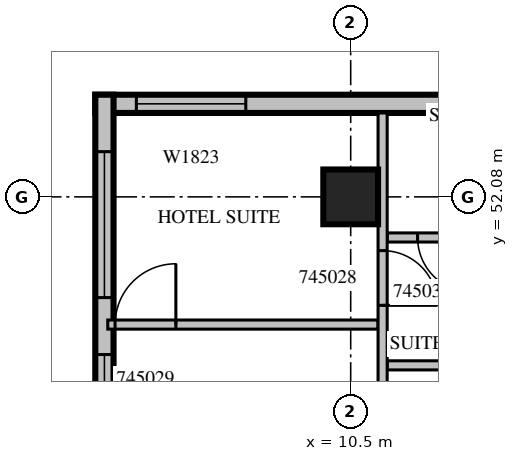
"""IFC4 building model, lengths in metres.
Left out: names, types, materials, properties, quantities, classifications, styles, units other than length and angle.
Written with IfcOpenShell. Run it as: python <this file> out.ifc"""

import sys

from ifc_helpers import new_model, si_unit, direction, frame, frame_2d, origin, origin_2d, place, context, subcontext, project, spatial, rectangle, extrude, source, transform, mapped, element, fill, save


model = new_model("IFC4")
c1 = context("Model", 3, precision=1e-05, world=origin(), true_north=direction((0.0, 1.0)))
c2 = subcontext(c1, "Body", "Model", "MODEL_VIEW")
j1 = project(units=[si_unit("LENGTHUNIT", "METRE"), si_unit("PLANEANGLEUNIT", "RADIAN")], contexts=[c1])
p1 = place(None, origin())
s1 = spatial("IfcSite", under=j1, at=p1, CompositionType="ELEMENT")
p2 = place(p1, origin())
s2 = spatial("IfcBuilding", under=s1, at=p2, CompositionType="ELEMENT")
p3 = place(p2, frame((0.0, 0.0, 204.4)))
s3 = spatial("IfcBuildingStorey", under=s2, at=p3, CompositionType="ELEMENT", Elevation=204.4)
m1 = source(origin(), c2, "Body", "SweptSolid", [
    extrude(rectangle(XDim=0.9, YDim=0.9, at=origin_2d()), origin(), (0.0, 0.0, 1.0), 3.8),
])
p4 = place(p3, frame((10.5, 52.08, 0.0), z_axis=(0.0, 0.0, 1.0), x_axis=(1.0, 0.0, 0.0)))
e1 = element("IfcColumn", 1, at=p4, inside=s3, PredefinedType="COLUMN", context=c2, shape_type="MappedRepresentation", body=[
    mapped(m1, transform((0.0, 0.0, 0.0), scale=1.0)),
])
m2 = source(origin(), c2, "Body", "SweptSolid", [
    extrude(rectangle(XDim=10.5, YDim=0.3, at=frame_2d((5.25, 0.0))), origin(), (0.0, 0.0, 1.0), 3.4),
])
p5 = place(p3, frame((16.8, 53.61, 0.0), z_axis=(0.0, 0.0, 1.0), x_axis=(-1.0, 0.0, 0.0)))
e2 = element("IfcWall", 2, at=p5, inside=s3, PredefinedType="STANDARD", context=c2, shape_type="MappedRepresentation", body=[
    mapped(m2, transform((0.0, 0.0, 0.0), scale=1.0)),
])
m3 = source(origin(), c2, "Body", "SweptSolid", [
    extrude(rectangle(XDim=1.2, YDim=2.3, at=frame_2d((0.6, 1.15))), frame((0.0, 0.16, 0.0), z_axis=(0.0, -1.0, 0.0), x_axis=(1.0, 0.0, 0.0)), (0.0, 0.0, 1.0), 0.32),
])
p6 = place(p5, frame((2.15, 0.0, 0.6)))
e3 = element("IfcOpeningElement", 3, at=p6, cuts=e2, PredefinedType="OPENING", context=c2, shape_type="MappedRepresentation", body=[
    mapped(m3, transform((0.0, 0.0, 0.0), scale=1.0)),
])
m4 = source(origin(), c2, "Body", "SweptSolid", [
    extrude(rectangle(XDim=1.8, YDim=2.3, at=frame_2d((0.9, 1.15))), frame((0.0, 0.16, 0.0), z_axis=(0.0, -1.0, 0.0), x_axis=(1.0, 0.0, 0.0)), (0.0, 0.0, 1.0), 0.32),
])
p7 = place(p5, frame((8.025, 0.0, 0.6)))
e4 = element("IfcOpeningElement", 4, at=p7, cuts=e2, PredefinedType="OPENING", context=c2, shape_type="MappedRepresentation", body=[
    mapped(m4, transform((0.0, 0.0, 0.0), scale=1.0)),
])
m5 = source(origin(), c2, "Body", "SweptSolid", [
    extrude(rectangle(XDim=9.91, YDim=0.3, at=frame_2d((4.955, 0.0))), origin(), (0.0, 0.0, 1.0), 3.4),
])
p8 = place(p3, frame((6.45, 53.76, 0.0), z_axis=(0.0, 0.0, 1.0), x_axis=(0.0, -1.0, 0.0)))
e5 = element("IfcWall", 5, at=p8, inside=s3, PredefinedType="STANDARD", context=c2, shape_type="MappedRepresentation", body=[
    mapped(m5, transform((0.0, 0.0, 0.0), scale=1.0)),
])
m6 = source(origin(), c2, "Body", "SweptSolid", [
    extrude(rectangle(XDim=2.4, YDim=2.3, at=frame_2d((1.2, 1.15))), frame((0.0, 0.16, 0.0), z_axis=(0.0, -1.0, 0.0), x_axis=(1.0, 0.0, 0.0)), (0.0, 0.0, 1.0), 0.32),
])
p9 = place(p8, frame((4.272, 0.0, 0.6)))
e6 = element("IfcOpeningElement", 6, at=p9, cuts=e5, PredefinedType="OPENING", context=c2, shape_type="MappedRepresentation", body=[
    mapped(m6, transform((0.0, 0.0, 0.0), scale=1.0)),
])
p10 = place(p8, frame((0.936, 0.0, 0.6)))
e7 = element("IfcOpeningElement", 7, at=p10, cuts=e5, PredefinedType="OPENING", context=c2, shape_type="MappedRepresentation", body=[
    mapped(m6, transform((0.0, 0.0, 0.0), scale=1.0)),
])
m7 = source(origin(), c2, "Body", "SweptSolid", [
    extrude(rectangle(XDim=4.445, YDim=0.15, at=frame_2d((2.223, 0.0))), origin(), (0.0, 0.0, 1.0), 3.4),
])
p11 = place(p3, frame((10.95, 49.98, 0.0), z_axis=(0.0, 0.0, 1.0), x_axis=(-1.0, 0.0, 0.0)))
e8 = element("IfcWall", 8, at=p11, inside=s3, PredefinedType="PARTITIONING", context=c2, shape_type="MappedRepresentation", body=[
    mapped(m7, transform((0.0, 0.0, 0.0), scale=1.0)),
])
m8 = source(origin(), c2, "Body", "SweptSolid", [
    extrude(rectangle(XDim=1.0, YDim=2.1, at=frame_2d((0.5, 1.05))), frame((0.0, 0.085, 0.0), z_axis=(0.0, -1.0, 0.0), x_axis=(1.0, 0.0, 0.0)), (0.0, 0.0, 1.0), 0.17),
])
p12 = place(p11, frame((3.325, 0.0, 0.0)))
e9 = element("IfcOpeningElement", 9, at=p12, cuts=e8, PredefinedType="OPENING", context=c2, shape_type="MappedRepresentation", body=[
    mapped(m8, transform((0.0, 0.0, 0.0), scale=1.0)),
])
m9 = source(origin(), c2, "Body", "SweptSolid", [
    extrude(rectangle(XDim=3.9, YDim=0.15, at=frame_2d((1.95, 0.0))), origin(), (0.0, 0.0, 1.0), 3.4),
])
p13 = place(p3, frame((15.0, 49.309, 0.0), z_axis=(0.0, 0.0, 1.0), x_axis=(-1.0, 0.0, 0.0)))
e10 = element("IfcWall", 10, at=p13, inside=s3, PredefinedType="PARTITIONING", context=c2, shape_type="MappedRepresentation", body=[
    mapped(m9, transform((0.0, 0.0, 0.0), scale=1.0)),
])
p14 = place(p3, frame((15.0, 51.412, 0.0), z_axis=(0.0, 0.0, 1.0), x_axis=(-1.0, 0.0, 0.0)))
e11 = element("IfcWall", 11, at=p14, inside=s3, PredefinedType="PARTITIONING", context=c2, shape_type="MappedRepresentation", body=[
    mapped(m9, transform((0.0, 0.0, 0.0), scale=1.0)),
])
m10 = source(origin(), c2, "Body", "SweptSolid", [
    extrude(rectangle(XDim=0.9, YDim=2.1, at=frame_2d((0.45, 1.05))), frame((0.0, 0.085, 0.0), z_axis=(0.0, -1.0, 0.0), x_axis=(1.0, 0.0, 0.0)), (0.0, 0.0, 1.0), 0.17),
])
p15 = place(p14, frame((1.5, 0.0, 0.0)))
e12 = element("IfcOpeningElement", 12, at=p15, cuts=e11, PredefinedType="OPENING", context=c2, shape_type="MappedRepresentation", body=[
    mapped(m10, transform((0.0, 0.0, 0.0), scale=1.0)),
])
p16 = place(p14, frame((0.5, 0.0, 0.0)))
e13 = element("IfcOpeningElement", 13, at=p16, cuts=e11, PredefinedType="OPENING", context=c2, shape_type="MappedRepresentation", body=[
    mapped(m10, transform((0.0, 0.0, 0.0), scale=1.0)),
])
p17 = place(p14, frame((2.5, 0.0, 0.0)))
e14 = element("IfcOpeningElement", 14, at=p17, cuts=e11, PredefinedType="OPENING", context=c2, shape_type="MappedRepresentation", body=[
    mapped(m10, transform((0.0, 0.0, 0.0), scale=1.0)),
])
m11 = source(origin(), c2, "Body", "SweptSolid", [
    extrude(rectangle(XDim=7.26, YDim=0.15, at=frame_2d((3.63, 0.0))), origin(), (0.0, 0.0, 1.0), 3.4),
])
p18 = place(p3, frame((11.025, 46.2, 0.0), z_axis=(0.0, 0.0, 1.0), x_axis=(0.0, 1.0, 0.0)))
e15 = element("IfcWall", 15, at=p18, inside=s3, PredefinedType="PARTITIONING", context=c2, shape_type="MappedRepresentation", body=[
    mapped(m11, transform((0.0, 0.0, 0.0), scale=1.0)),
])
m12 = source(origin(), c2, "Body", "SweptSolid", [
    extrude(rectangle(XDim=1.1, YDim=2.1, at=frame_2d((0.55, 1.05))), frame((0.0, 0.085, 0.0), z_axis=(0.0, -1.0, 0.0), x_axis=(1.0, 0.0, 0.0)), (0.0, 0.0, 1.0), 0.17),
])
p19 = place(p18, frame((0.896, 0.0, 0.0)))
e16 = element("IfcOpeningElement", 16, at=p19, cuts=e15, PredefinedType="OPENING", context=c2, shape_type="MappedRepresentation", body=[
    mapped(m12, transform((0.0, 0.0, 0.0), scale=1.0)),
])
p20 = place(p18, frame((4.096, 0.0, 0.0)))
e17 = element("IfcOpeningElement", 17, at=p20, cuts=e15, PredefinedType="OPENING", context=c2, shape_type="MappedRepresentation", body=[
    mapped(m10, transform((0.0, 0.0, 0.0), scale=1.0)),
])
m13 = source(origin(), c2, "Body", "SweptSolid", [
    extrude(rectangle(XDim=1.8, YDim=2.3, at=frame_2d((0.9, 1.15))), frame((0.0, 0.03, 0.0), z_axis=(0.0, -1.0, 0.0), x_axis=(1.0, 0.0, 0.0)), (0.0, 0.0, 1.0), 0.06),
])
p21 = place(p7, origin())
e18 = element("IfcWindow", 18, at=p21, inside=s3, PartitioningType="SINGLE_PANEL", PredefinedType="WINDOW", context=c2, shape_type="MappedRepresentation", body=[
    mapped(m13, transform((0.0, 0.0, 0.0), scale=1.0)),
])
fill(e4, e18)
m14 = source(origin(), c2, "Body", "SweptSolid", [
    extrude(rectangle(XDim=2.4, YDim=2.3, at=frame_2d((1.2, 1.15))), frame((0.0, 0.03, 0.0), z_axis=(0.0, -1.0, 0.0), x_axis=(1.0, 0.0, 0.0)), (0.0, 0.0, 1.0), 0.06),
])
p22 = place(p9, origin())
e19 = element("IfcWindow", 19, at=p22, inside=s3, PartitioningType="SINGLE_PANEL", PredefinedType="WINDOW", context=c2, shape_type="MappedRepresentation", body=[
    mapped(m14, transform((0.0, 0.0, 0.0), scale=1.0)),
])
fill(e6, e19)
p23 = place(p10, origin())
e20 = element("IfcWindow", 20, at=p23, inside=s3, PartitioningType="SINGLE_PANEL", PredefinedType="WINDOW", context=c2, shape_type="MappedRepresentation", body=[
    mapped(m14, transform((0.0, 0.0, 0.0), scale=1.0)),
])
fill(e7, e20)
m15 = source(origin(), c2, "Body", "SweptSolid", [
    extrude(rectangle(XDim=0.9, YDim=2.1, at=frame_2d((0.45, 1.05))), frame((0.0, 0.025, 0.0), z_axis=(0.0, -1.0, 0.0), x_axis=(1.0, 0.0, 0.0)), (0.0, 0.0, 1.0), 0.05),
])
p24 = place(p20, origin())
e21 = element("IfcDoor", 21, at=p24, inside=s3, OperationType="SINGLE_SWING_RIGHT", PredefinedType="DOOR", context=c2, shape_type="MappedRepresentation", body=[
    mapped(m15, transform((0.0, 0.0, 0.0), scale=1.0)),
])
fill(e17, e21)
m16 = source(origin(), c2, "Body", "SweptSolid", [
    extrude(rectangle(XDim=1.0, YDim=2.1, at=frame_2d((0.5, 1.05))), frame((0.0, 0.025, 0.0), z_axis=(0.0, -1.0, 0.0), x_axis=(1.0, 0.0, 0.0)), (0.0, 0.0, 1.0), 0.05),
])
p25 = place(p12, origin())
e22 = element("IfcDoor", 22, at=p25, inside=s3, OperationType="SINGLE_SWING_RIGHT", PredefinedType="DOOR", context=c2, shape_type="MappedRepresentation", body=[
    mapped(m16, transform((0.0, 0.0, 0.0), scale=1.0)),
])
fill(e9, e22)
p26 = place(p17, origin())
e23 = element("IfcDoor", 23, at=p26, inside=s3, OperationType="SINGLE_SWING_LEFT", PredefinedType="DOOR", context=c2, shape_type="MappedRepresentation", body=[
    mapped(m15, transform((0.0, 0.0, 0.0), scale=1.0)),
])
fill(e14, e23)
save(model, sys.argv[1])
